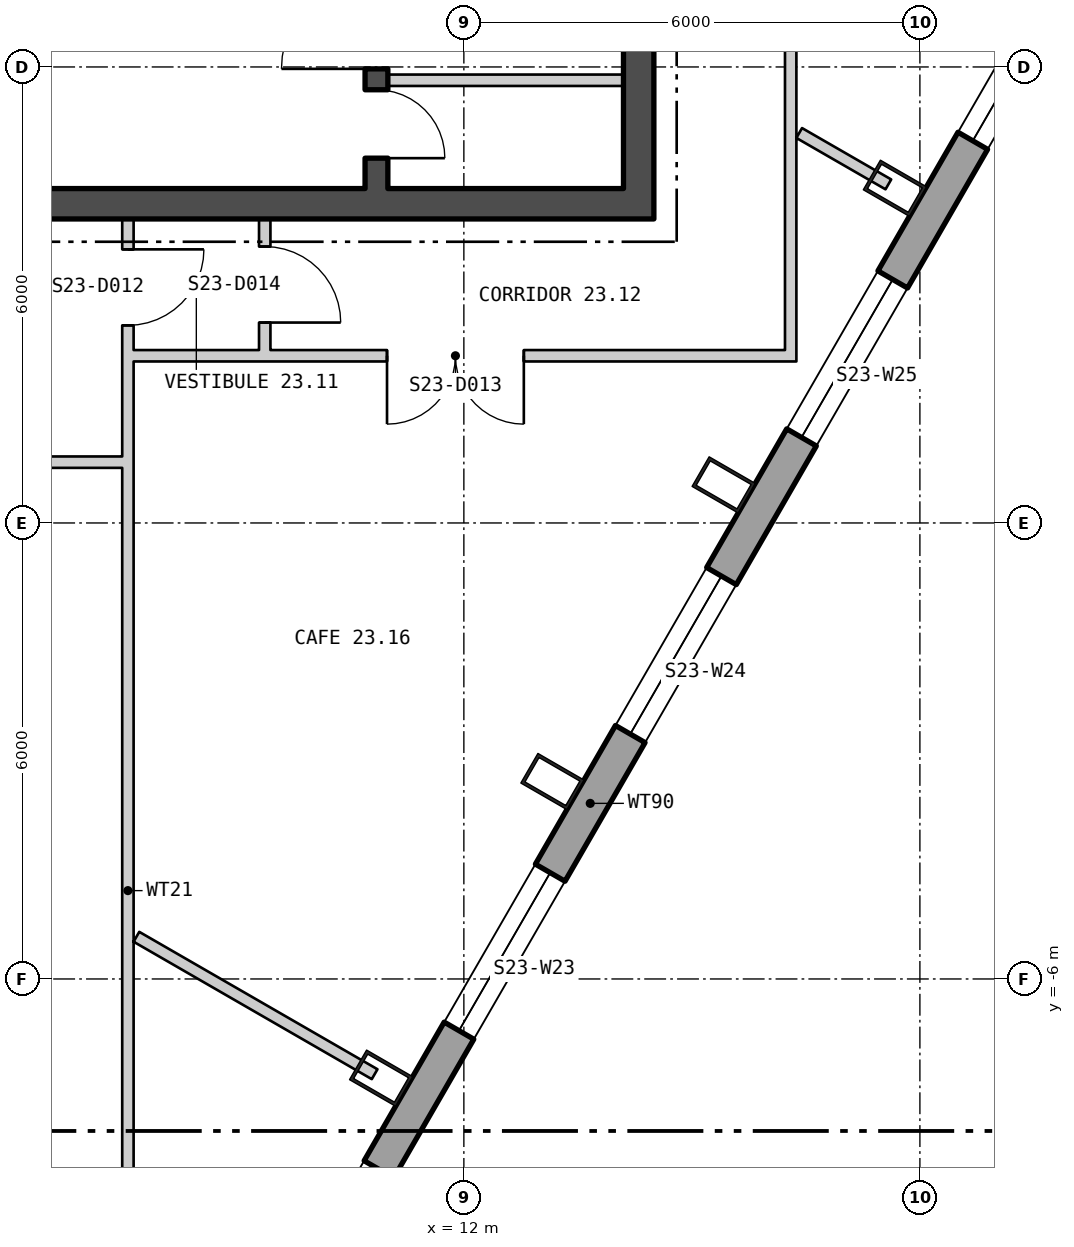
"""IFC4 building model, lengths in metres.
Left out: names, types, materials, properties, quantities, classifications, styles, units other than length and angle.
Written with IfcOpenShell. Run it as: python <this file> out.ifc"""

import sys

from ifc_helpers import new_model, si_unit, direction, frame, frame_2d, origin, origin_2d, place, context, subcontext, project, spatial, polyline, rectangle, hollow_rectangle, outline, extrude, element, fill, save


model = new_model("IFC4")
c1 = context("Model", 3, precision=1e-05, world=origin(), true_north=direction((0.0, 1.0)))
c2 = subcontext(c1, "Body", "Model", "MODEL_VIEW")
j1 = project(units=[si_unit("LENGTHUNIT", "METRE"), si_unit("PLANEANGLEUNIT", "RADIAN")], contexts=[c1])
p1 = place(None, origin())
s1 = spatial("IfcSite", under=j1, at=p1, CompositionType="ELEMENT")
p2 = place(p1, origin())
s2 = spatial("IfcBuilding", under=s1, at=p2, CompositionType="ELEMENT")
p3 = place(p2, frame((0.0, 0.0, 304.2)))
s3 = spatial("IfcBuildingStorey", under=s2, at=p3, CompositionType="ELEMENT", Elevation=304.2)
for number, where, z_axis, x_axis in (
    (1, (10.911, -7.305, 0.0), (0.0, 0.0, 1.0), (0.5, 0.866, 0.0)),
    (2, (13.165, -3.402, 0.0), (0.0, 0.0, 1.0), (0.5, 0.866, 0.0)),
    (3, (15.418, 0.501, 0.0), (0.0, 0.0, 1.0), (0.5, 0.866, 0.0)),
    (4, (17.671, 4.404, 0.0), (0.0, 0.0, 1.0), (0.5, 0.866, 0.0)),
):
    element("IfcColumn", number, at=place(p3, frame(where, z_axis=z_axis, x_axis=x_axis)), inside=s3, PredefinedType="COLUMN", context=c2, shape_type="SweptSolid", body=[
        extrude(hollow_rectangle(XDim=0.45, YDim=0.7, WallThickness=0.04, at=origin_2d()), origin(), (0.0, 0.0, 1.0), 4.2),
    ])
p4 = place(p3, frame((2.23, -23.491, -0.18), z_axis=(0.0, 0.0, 1.0), x_axis=(0.500000141277, 0.866025322218, 0.0)))
e5 = element("IfcWall", 5, at=p4, inside=s3, PredefinedType="SOLIDWALL", context=c2, shape_type="SweptSolid", body=[
    extrude(outline(polyline([(-0.13, -0.225), (45.86, -0.225), (45.6, 0.225), (0.13, 0.225), (-0.13, -0.225)])), origin(), (0.0, 0.0, 1.0), 3.98),
])
p5 = place(p4, frame((1.424, 0.0, 1.08)))
e6 = element("IfcOpeningElement", 6, at=p5, cuts=e5, PredefinedType="OPENING", context=c2, shape_type="SweptSolid", body=[
    extrude(rectangle(XDim=2.4, YDim=2.3, at=frame_2d((1.2, 1.15))), frame((0.0, 0.235, 0.0), z_axis=(0.0, -1.0, 0.0), x_axis=(1.0, 0.0, 0.0)), (0.0, 0.0, 1.0), 0.47),
])
p6 = place(p4, frame((5.892, 0.0, 1.08)))
e7 = element("IfcOpeningElement", 7, at=p6, cuts=e5, PredefinedType="OPENING", context=c2, shape_type="SweptSolid", body=[
    extrude(rectangle(XDim=2.4, YDim=2.3, at=frame_2d((1.2, 1.15))), frame((0.0, 0.235, 0.0), z_axis=(0.0, -1.0, 0.0), x_axis=(1.0, 0.0, 0.0)), (0.0, 0.0, 1.0), 0.47),
])
p7 = place(p4, frame((10.399, 0.0, 1.08)))
e8 = element("IfcOpeningElement", 8, at=p7, cuts=e5, PredefinedType="OPENING", context=c2, shape_type="SweptSolid", body=[
    extrude(rectangle(XDim=2.4, YDim=2.3, at=frame_2d((1.2, 1.15))), frame((0.0, 0.235, 0.0), z_axis=(0.0, -1.0, 0.0), x_axis=(1.0, 0.0, 0.0)), (0.0, 0.0, 1.0), 0.47),
])
p8 = place(p4, frame((14.905, 0.0, 1.08)))
e9 = element("IfcOpeningElement", 9, at=p8, cuts=e5, PredefinedType="OPENING", context=c2, shape_type="SweptSolid", body=[
    extrude(rectangle(XDim=2.4, YDim=2.3, at=frame_2d((1.2, 1.15))), frame((0.0, 0.235, 0.0), z_axis=(0.0, -1.0, 0.0), x_axis=(1.0, 0.0, 0.0)), (0.0, 0.0, 1.0), 0.47),
])
p9 = place(p4, frame((19.412, 0.0, 1.08)))
e10 = element("IfcOpeningElement", 10, at=p9, cuts=e5, PredefinedType="OPENING", context=c2, shape_type="SweptSolid", body=[
    extrude(rectangle(XDim=2.4, YDim=2.3, at=frame_2d((1.2, 1.15))), frame((0.0, 0.235, 0.0), z_axis=(0.0, -1.0, 0.0), x_axis=(1.0, 0.0, 0.0)), (0.0, 0.0, 1.0), 0.47),
])
p10 = place(p4, frame((23.918, 0.0, 1.08)))
e11 = element("IfcOpeningElement", 11, at=p10, cuts=e5, PredefinedType="OPENING", context=c2, shape_type="SweptSolid", body=[
    extrude(rectangle(XDim=2.4, YDim=2.3, at=frame_2d((1.2, 1.15))), frame((0.0, 0.235, 0.0), z_axis=(0.0, -1.0, 0.0), x_axis=(1.0, 0.0, 0.0)), (0.0, 0.0, 1.0), 0.47),
])
p11 = place(p4, frame((28.425, 0.0, 1.08)))
e12 = element("IfcOpeningElement", 12, at=p11, cuts=e5, PredefinedType="OPENING", context=c2, shape_type="SweptSolid", body=[
    extrude(rectangle(XDim=2.4, YDim=2.3, at=frame_2d((1.2, 1.15))), frame((0.0, 0.235, 0.0), z_axis=(0.0, -1.0, 0.0), x_axis=(1.0, 0.0, 0.0)), (0.0, 0.0, 1.0), 0.47),
])
p12 = place(p4, frame((32.932, 0.0, 1.08)))
e13 = element("IfcOpeningElement", 13, at=p12, cuts=e5, PredefinedType="OPENING", context=c2, shape_type="SweptSolid", body=[
    extrude(rectangle(XDim=2.4, YDim=2.3, at=frame_2d((1.2, 1.15))), frame((0.0, 0.235, 0.0), z_axis=(0.0, -1.0, 0.0), x_axis=(1.0, 0.0, 0.0)), (0.0, 0.0, 1.0), 0.47),
])
p13 = place(p4, frame((37.438, 0.0, 1.08)))
e14 = element("IfcOpeningElement", 14, at=p13, cuts=e5, PredefinedType="OPENING", context=c2, shape_type="SweptSolid", body=[
    extrude(rectangle(XDim=2.4, YDim=2.3, at=frame_2d((1.2, 1.15))), frame((0.0, 0.235, 0.0), z_axis=(0.0, -1.0, 0.0), x_axis=(1.0, 0.0, 0.0)), (0.0, 0.0, 1.0), 0.47),
])
p14 = place(p4, frame((41.907, 0.0, 1.08)))
e15 = element("IfcOpeningElement", 15, at=p14, cuts=e5, PredefinedType="OPENING", context=c2, shape_type="SweptSolid", body=[
    extrude(rectangle(XDim=2.4, YDim=2.3, at=frame_2d((1.2, 1.15))), frame((0.0, 0.235, 0.0), z_axis=(0.0, -1.0, 0.0), x_axis=(1.0, 0.0, 0.0)), (0.0, 0.0, 1.0), 0.47),
])
p15 = place(p3, frame((-14.5, 4.2, 0.0), z_axis=(0.0, 0.0, 1.0), x_axis=(1.0, 0.0, 0.0)))
e16 = element("IfcWall", 16, at=p15, inside=s3, PredefinedType="SHEAR", context=c2, shape_type="SweptSolid", body=[
    extrude(rectangle(XDim=29.0, YDim=0.4, at=frame_2d((14.5, 0.0))), origin(), (0.0, 0.0, 1.0), 4.0),
])
p16 = place(p15, frame((9.0, 0.0, 0.0)))
e17 = element("IfcOpeningElement", 17, at=p16, cuts=e16, PredefinedType="OPENING", context=c2, shape_type="SweptSolid", body=[
    extrude(rectangle(XDim=1.8, YDim=2.4, at=frame_2d((0.9, 1.2))), frame((0.0, 0.21, 0.0), z_axis=(0.0, -1.0, 0.0), x_axis=(1.0, 0.0, 0.0)), (0.0, 0.0, 1.0), 0.42),
])
p17 = place(p15, frame((19.0, 0.0, 0.0)))
e18 = element("IfcOpeningElement", 18, at=p17, cuts=e16, PredefinedType="OPENING", context=c2, shape_type="SweptSolid", body=[
    extrude(rectangle(XDim=1.8, YDim=2.4, at=frame_2d((0.9, 1.2))), frame((0.0, 0.21, 0.0), z_axis=(0.0, -1.0, 0.0), x_axis=(1.0, 0.0, 0.0)), (0.0, 0.0, 1.0), 0.42),
])
p18 = place(p3, frame((14.3, 4.4, 0.0), z_axis=(0.0, 0.0, 1.0), x_axis=(0.0, 1.0, 0.0)))
e19 = element("IfcWall", 19, at=p18, inside=s3, PredefinedType="SHEAR", context=c2, shape_type="SweptSolid", body=[
    extrude(rectangle(XDim=13.2, YDim=0.4, at=frame_2d((6.6, 0.0))), origin(), (0.0, 0.0, 1.0), 4.0),
])
p19 = place(p18, frame((3.05, 0.0, 0.0)))
e20 = element("IfcOpeningElement", 20, at=p19, cuts=e19, PredefinedType="OPENING", context=c2, shape_type="SweptSolid", body=[
    extrude(rectangle(XDim=1.5, YDim=2.1, at=frame_2d((0.75, 1.05))), frame((0.0, 0.21, 0.0), z_axis=(0.0, -1.0, 0.0), x_axis=(1.0, 0.0, 0.0)), (0.0, 0.0, 1.0), 0.42),
])
p20 = place(p3, frame((10.85, 4.4, 0.0), z_axis=(0.0, 0.0, 1.0), x_axis=(0.0, 1.0, 0.0)))
e21 = element("IfcWall", 21, at=p20, inside=s3, PredefinedType="SHEAR", context=c2, shape_type="SweptSolid", body=[
    extrude(rectangle(XDim=13.2, YDim=0.3, at=frame_2d((6.6, 0.0))), origin(), (0.0, 0.0, 1.0), 4.0),
])
p21 = place(p20, frame((1.575, 0.0, 0.0)))
e22 = element("IfcOpeningElement", 22, at=p21, cuts=e21, PredefinedType="OPENING", context=c2, shape_type="SweptSolid", body=[
    extrude(rectangle(XDim=1.25, YDim=2.1, at=frame_2d((0.625, 1.05))), frame((0.0, 0.16, 0.0), z_axis=(0.0, -1.0, 0.0), x_axis=(1.0, 0.0, 0.0)), (0.0, 0.0, 1.0), 0.32),
])
p22 = place(p20, frame((0.4, 0.0, 0.0)))
e23 = element("IfcOpeningElement", 23, at=p22, cuts=e21, PredefinedType="OPENING", context=c2, shape_type="SweptSolid", body=[
    extrude(rectangle(XDim=0.9, YDim=2.1, at=frame_2d((0.45, 1.05))), frame((0.0, 0.16, 0.0), z_axis=(0.0, -1.0, 0.0), x_axis=(1.0, 0.0, 0.0)), (0.0, 0.0, 1.0), 0.32),
])
p23 = place(p3, frame((11.0, 5.825, 0.0), z_axis=(0.0, 0.0, 1.0), x_axis=(1.0, 0.0, 0.0)))
e24 = element("IfcWall", 24, at=p23, inside=s3, PredefinedType="PARTITIONING", context=c2, shape_type="SweptSolid", body=[
    extrude(rectangle(XDim=3.1, YDim=0.15, at=frame_2d((1.55, 0.0))), origin(), (0.0, 0.0, 1.0), 4.0),
])
p24 = place(p3, frame((-7.58, 0.8, 0.0), z_axis=(0.0, 0.0, 1.0), x_axis=(1.0, 0.0, 0.0)))
e25 = element("IfcWall", 25, at=p24, inside=s3, PredefinedType="PARTITIONING", context=c2, shape_type="SweptSolid", body=[
    extrude(rectangle(XDim=15.085, YDim=0.15, at=frame_2d((7.543, 0.0))), origin(), (0.0, 0.0, 1.0), 4.0),
])
p25 = place(p24, frame((1.206, 0.0, 0.0)))
e26 = element("IfcOpeningElement", 26, at=p25, cuts=e25, PredefinedType="OPENING", context=c2, shape_type="SweptSolid", body=[
    extrude(rectangle(XDim=1.0, YDim=2.1, at=frame_2d((0.5, 1.05))), frame((0.0, 0.085, 0.0), z_axis=(0.0, -1.0, 0.0), x_axis=(1.0, 0.0, 0.0)), (0.0, 0.0, 1.0), 0.17),
])
p26 = place(p24, frame((12.917, 0.0, 0.0)))
e27 = element("IfcOpeningElement", 27, at=p26, cuts=e25, PredefinedType="OPENING", context=c2, shape_type="SweptSolid", body=[
    extrude(rectangle(XDim=1.0, YDim=2.1, at=frame_2d((0.5, 1.05))), frame((0.0, 0.085, 0.0), z_axis=(0.0, -1.0, 0.0), x_axis=(1.0, 0.0, 0.0)), (0.0, 0.0, 1.0), 0.17),
])
p27 = place(p3, frame((7.58, -13.675, 0.0), z_axis=(0.0, 0.0, 1.0), x_axis=(0.0, 1.0, 0.0)))
e28 = element("IfcWall", 28, at=p27, inside=s3, PredefinedType="PARTITIONING", context=c2, shape_type="SweptSolid", body=[
    extrude(rectangle(XDim=17.675, YDim=0.15, at=frame_2d((8.838, 0.0))), origin(), (0.0, 0.0, 1.0), 4.0),
])
p28 = place(p27, frame((3.684, 0.0, 0.0)))
e29 = element("IfcOpeningElement", 29, at=p28, cuts=e28, PredefinedType="OPENING", context=c2, shape_type="SweptSolid", body=[
    extrude(rectangle(XDim=1.0, YDim=2.1, at=frame_2d((0.5, 1.05))), frame((0.0, 0.085, 0.0), z_axis=(0.0, -1.0, 0.0), x_axis=(1.0, 0.0, 0.0)), (0.0, 0.0, 1.0), 0.17),
])
p29 = place(p27, frame((16.275, 0.0, 0.0)))
e30 = element("IfcOpeningElement", 30, at=p29, cuts=e28, PredefinedType="OPENING", context=c2, shape_type="SweptSolid", body=[
    extrude(rectangle(XDim=1.0, YDim=2.1, at=frame_2d((0.5, 1.05))), frame((0.0, 0.085, 0.0), z_axis=(0.0, -1.0, 0.0), x_axis=(1.0, 0.0, 0.0)), (0.0, 0.0, 1.0), 0.17),
])
p30 = place(p3, frame((7.655, 2.2, 0.0), z_axis=(0.0, 0.0, 1.0), x_axis=(1.0, 0.0, 0.0)))
e31 = element("IfcWall", 31, at=p30, inside=s3, PredefinedType="PARTITIONING", context=c2, shape_type="SweptSolid", body=[
    extrude(rectangle(XDim=8.57, YDim=0.15, at=frame_2d((4.285, 0.0))), origin(), (0.0, 0.0, 1.0), 4.0),
])
p31 = place(p30, frame((3.334, 0.0, 0.0)))
e32 = element("IfcOpeningElement", 32, at=p31, cuts=e31, PredefinedType="OPENING", context=c2, shape_type="SweptSolid", body=[
    extrude(rectangle(XDim=1.8, YDim=2.1, at=frame_2d((0.9, 1.05))), frame((0.0, 0.085, 0.0), z_axis=(0.0, -1.0, 0.0), x_axis=(1.0, 0.0, 0.0)), (0.0, 0.0, 1.0), 0.17),
])
p32 = place(p3, frame((7.692, -5.445, 0.0), z_axis=(0.0, 0.0, 1.0), x_axis=(0.866194788555, -0.49970650214, 0.0)))
e33 = element("IfcWall", 33, at=p32, inside=s3, PredefinedType="PARTITIONING", context=c2, shape_type="SweptSolid", body=[
    extrude(rectangle(XDim=3.618, YDim=0.15, at=frame_2d((1.809, 0.0))), origin(), (0.0, 0.0, 1.0), 4.0),
])
p33 = place(p3, frame((9.38, 2.275, 0.0), z_axis=(0.0, 0.0, 1.0), x_axis=(0.0, 1.0, 0.0)))
e34 = element("IfcWall", 34, at=p33, inside=s3, PredefinedType="PARTITIONING", context=c2, shape_type="SweptSolid", body=[
    extrude(rectangle(XDim=1.725, YDim=0.15, at=frame_2d((0.863, 0.0))), origin(), (0.0, 0.0, 1.0), 4.0),
])
p34 = place(p33, frame((0.362, 0.0, 0.0)))
e35 = element("IfcOpeningElement", 35, at=p34, cuts=e34, PredefinedType="OPENING", context=c2, shape_type="SweptSolid", body=[
    extrude(rectangle(XDim=1.0, YDim=2.1, at=frame_2d((0.5, 1.05))), frame((0.0, 0.085, 0.0), z_axis=(0.0, -1.0, 0.0), x_axis=(1.0, 0.0, 0.0)), (0.0, 0.0, 1.0), 0.17),
])
p35 = place(p3, frame((16.3, 2.125, 0.0), z_axis=(0.0, 0.0, 1.0), x_axis=(0.0, 1.0, 0.0)))
e36 = element("IfcWall", 36, at=p35, inside=s3, PredefinedType="PARTITIONING", context=c2, shape_type="SweptSolid", body=[
    extrude(rectangle(XDim=17.623, YDim=0.15, at=frame_2d((8.812, 0.0))), origin(), (0.0, 0.0, 1.0), 4.0),
])
p36 = place(p35, frame((6.627, 0.0, 0.0)))
e37 = element("IfcOpeningElement", 37, at=p36, cuts=e36, PredefinedType="OPENING", context=c2, shape_type="SweptSolid", body=[
    extrude(rectangle(XDim=1.0, YDim=2.1, at=frame_2d((0.5, 1.05))), frame((0.0, 0.085, 0.0), z_axis=(0.0, -1.0, 0.0), x_axis=(1.0, 0.0, 0.0)), (0.0, 0.0, 1.0), 0.17),
])
p37 = place(p35, frame((12.292, 0.0, 0.0)))
e38 = element("IfcOpeningElement", 38, at=p37, cuts=e36, PredefinedType="OPENING", context=c2, shape_type="SweptSolid", body=[
    extrude(rectangle(XDim=1.8, YDim=2.1, at=frame_2d((0.9, 1.05))), frame((0.0, 0.085, 0.0), z_axis=(0.0, -1.0, 0.0), x_axis=(1.0, 0.0, 0.0)), (0.0, 0.0, 1.0), 0.17),
])
p38 = place(p3, frame((16.412, 5.131, 0.0), z_axis=(0.0, 0.0, 1.0), x_axis=(0.866419132933, -0.499317420173, 0.0)))
e39 = element("IfcWall", 39, at=p38, inside=s3, PredefinedType="PARTITIONING", context=c2, shape_type="SweptSolid", body=[
    extrude(rectangle(XDim=1.354, YDim=0.15, at=frame_2d((0.677, 0.0))), origin(), (0.0, 0.0, 1.0), 4.0),
])
p39 = place(p8, origin())
e40 = element("IfcWindow", 40, at=p39, inside=s3, PartitioningType="SINGLE_PANEL", PredefinedType="WINDOW", context=c2, shape_type="SweptSolid", body=[
    extrude(rectangle(XDim=2.4, YDim=2.3, at=frame_2d((1.2, 1.15))), frame((0.0, 0.105, 0.0), z_axis=(0.0, -1.0, 0.0), x_axis=(1.0, 0.0, 0.0)), (0.0, 0.0, 1.0), 0.06),
])
fill(e9, e40)
p40 = place(p9, origin())
e41 = element("IfcWindow", 41, at=p40, inside=s3, PartitioningType="SINGLE_PANEL", PredefinedType="WINDOW", context=c2, shape_type="SweptSolid", body=[
    extrude(rectangle(XDim=2.4, YDim=2.3, at=frame_2d((1.2, 1.15))), frame((0.0, 0.105, 0.0), z_axis=(0.0, -1.0, 0.0), x_axis=(1.0, 0.0, 0.0)), (0.0, 0.0, 1.0), 0.06),
])
fill(e10, e41)
p41 = place(p10, origin())
e42 = element("IfcWindow", 42, at=p41, inside=s3, PartitioningType="SINGLE_PANEL", PredefinedType="WINDOW", context=c2, shape_type="SweptSolid", body=[
    extrude(rectangle(XDim=2.4, YDim=2.3, at=frame_2d((1.2, 1.15))), frame((0.0, 0.105, 0.0), z_axis=(0.0, -1.0, 0.0), x_axis=(1.0, 0.0, 0.0)), (0.0, 0.0, 1.0), 0.06),
])
fill(e11, e42)
p42 = place(p11, origin())
e43 = element("IfcWindow", 43, at=p42, inside=s3, PartitioningType="SINGLE_PANEL", PredefinedType="WINDOW", context=c2, shape_type="SweptSolid", body=[
    extrude(rectangle(XDim=2.4, YDim=2.3, at=frame_2d((1.2, 1.15))), frame((0.0, 0.105, 0.0), z_axis=(0.0, -1.0, 0.0), x_axis=(1.0, 0.0, 0.0)), (0.0, 0.0, 1.0), 0.06),
])
fill(e12, e43)
p43 = place(p12, origin())
e44 = element("IfcWindow", 44, at=p43, inside=s3, PartitioningType="SINGLE_PANEL", PredefinedType="WINDOW", context=c2, shape_type="SweptSolid", body=[
    extrude(rectangle(XDim=2.4, YDim=2.3, at=frame_2d((1.2, 1.15))), frame((0.0, 0.105, 0.0), z_axis=(0.0, -1.0, 0.0), x_axis=(1.0, 0.0, 0.0)), (0.0, 0.0, 1.0), 0.06),
])
fill(e13, e44)
p44 = place(p21, origin())
e45 = element("IfcDoor", 45, at=p44, inside=s3, OperationType="SINGLE_SWING_RIGHT", PredefinedType="DOOR", context=c2, shape_type="SweptSolid", body=[
    extrude(rectangle(XDim=1.25, YDim=2.1, at=frame_2d((0.625, 1.05))), frame((0.0, 0.025, 0.0), z_axis=(0.0, -1.0, 0.0), x_axis=(1.0, 0.0, 0.0)), (0.0, 0.0, 1.0), 0.05),
])
fill(e22, e45)
p45 = place(p22, origin())
e46 = element("IfcDoor", 46, at=p45, inside=s3, OperationType="SINGLE_SWING_LEFT", PredefinedType="DOOR", context=c2, shape_type="SweptSolid", body=[
    extrude(rectangle(XDim=0.9, YDim=2.1, at=frame_2d((0.45, 1.05))), frame((0.0, 0.025, 0.0), z_axis=(0.0, -1.0, 0.0), x_axis=(1.0, 0.0, 0.0)), (0.0, 0.0, 1.0), 0.05),
])
fill(e23, e46)
p46 = place(p29, origin())
e47 = element("IfcDoor", 47, at=p46, inside=s3, OperationType="SINGLE_SWING_RIGHT", PredefinedType="DOOR", context=c2, shape_type="SweptSolid", body=[
    extrude(rectangle(XDim=1.0, YDim=2.1, at=frame_2d((0.5, 1.05))), frame((0.0, 0.025, 0.0), z_axis=(0.0, -1.0, 0.0), x_axis=(1.0, 0.0, 0.0)), (0.0, 0.0, 1.0), 0.05),
])
fill(e30, e47)
p47 = place(p31, origin())
e48 = element("IfcDoor", 48, at=p47, inside=s3, OperationType="DOUBLE_DOOR_SINGLE_SWING", PredefinedType="DOOR", context=c2, shape_type="SweptSolid", body=[
    extrude(rectangle(XDim=1.8, YDim=2.1, at=frame_2d((0.9, 1.05))), frame((0.0, 0.025, 0.0), z_axis=(0.0, -1.0, 0.0), x_axis=(1.0, 0.0, 0.0)), (0.0, 0.0, 1.0), 0.05),
])
fill(e32, e48)
p48 = place(p34, origin())
e49 = element("IfcDoor", 49, at=p48, inside=s3, OperationType="SINGLE_SWING_LEFT", PredefinedType="DOOR", context=c2, shape_type="SweptSolid", body=[
    extrude(rectangle(XDim=1.0, YDim=2.1, at=frame_2d((0.5, 1.05))), frame((0.0, 0.025, 0.0), z_axis=(0.0, -1.0, 0.0), x_axis=(1.0, 0.0, 0.0)), (0.0, 0.0, 1.0), 0.05),
])
fill(e35, e49)
save(model, sys.argv[1])
